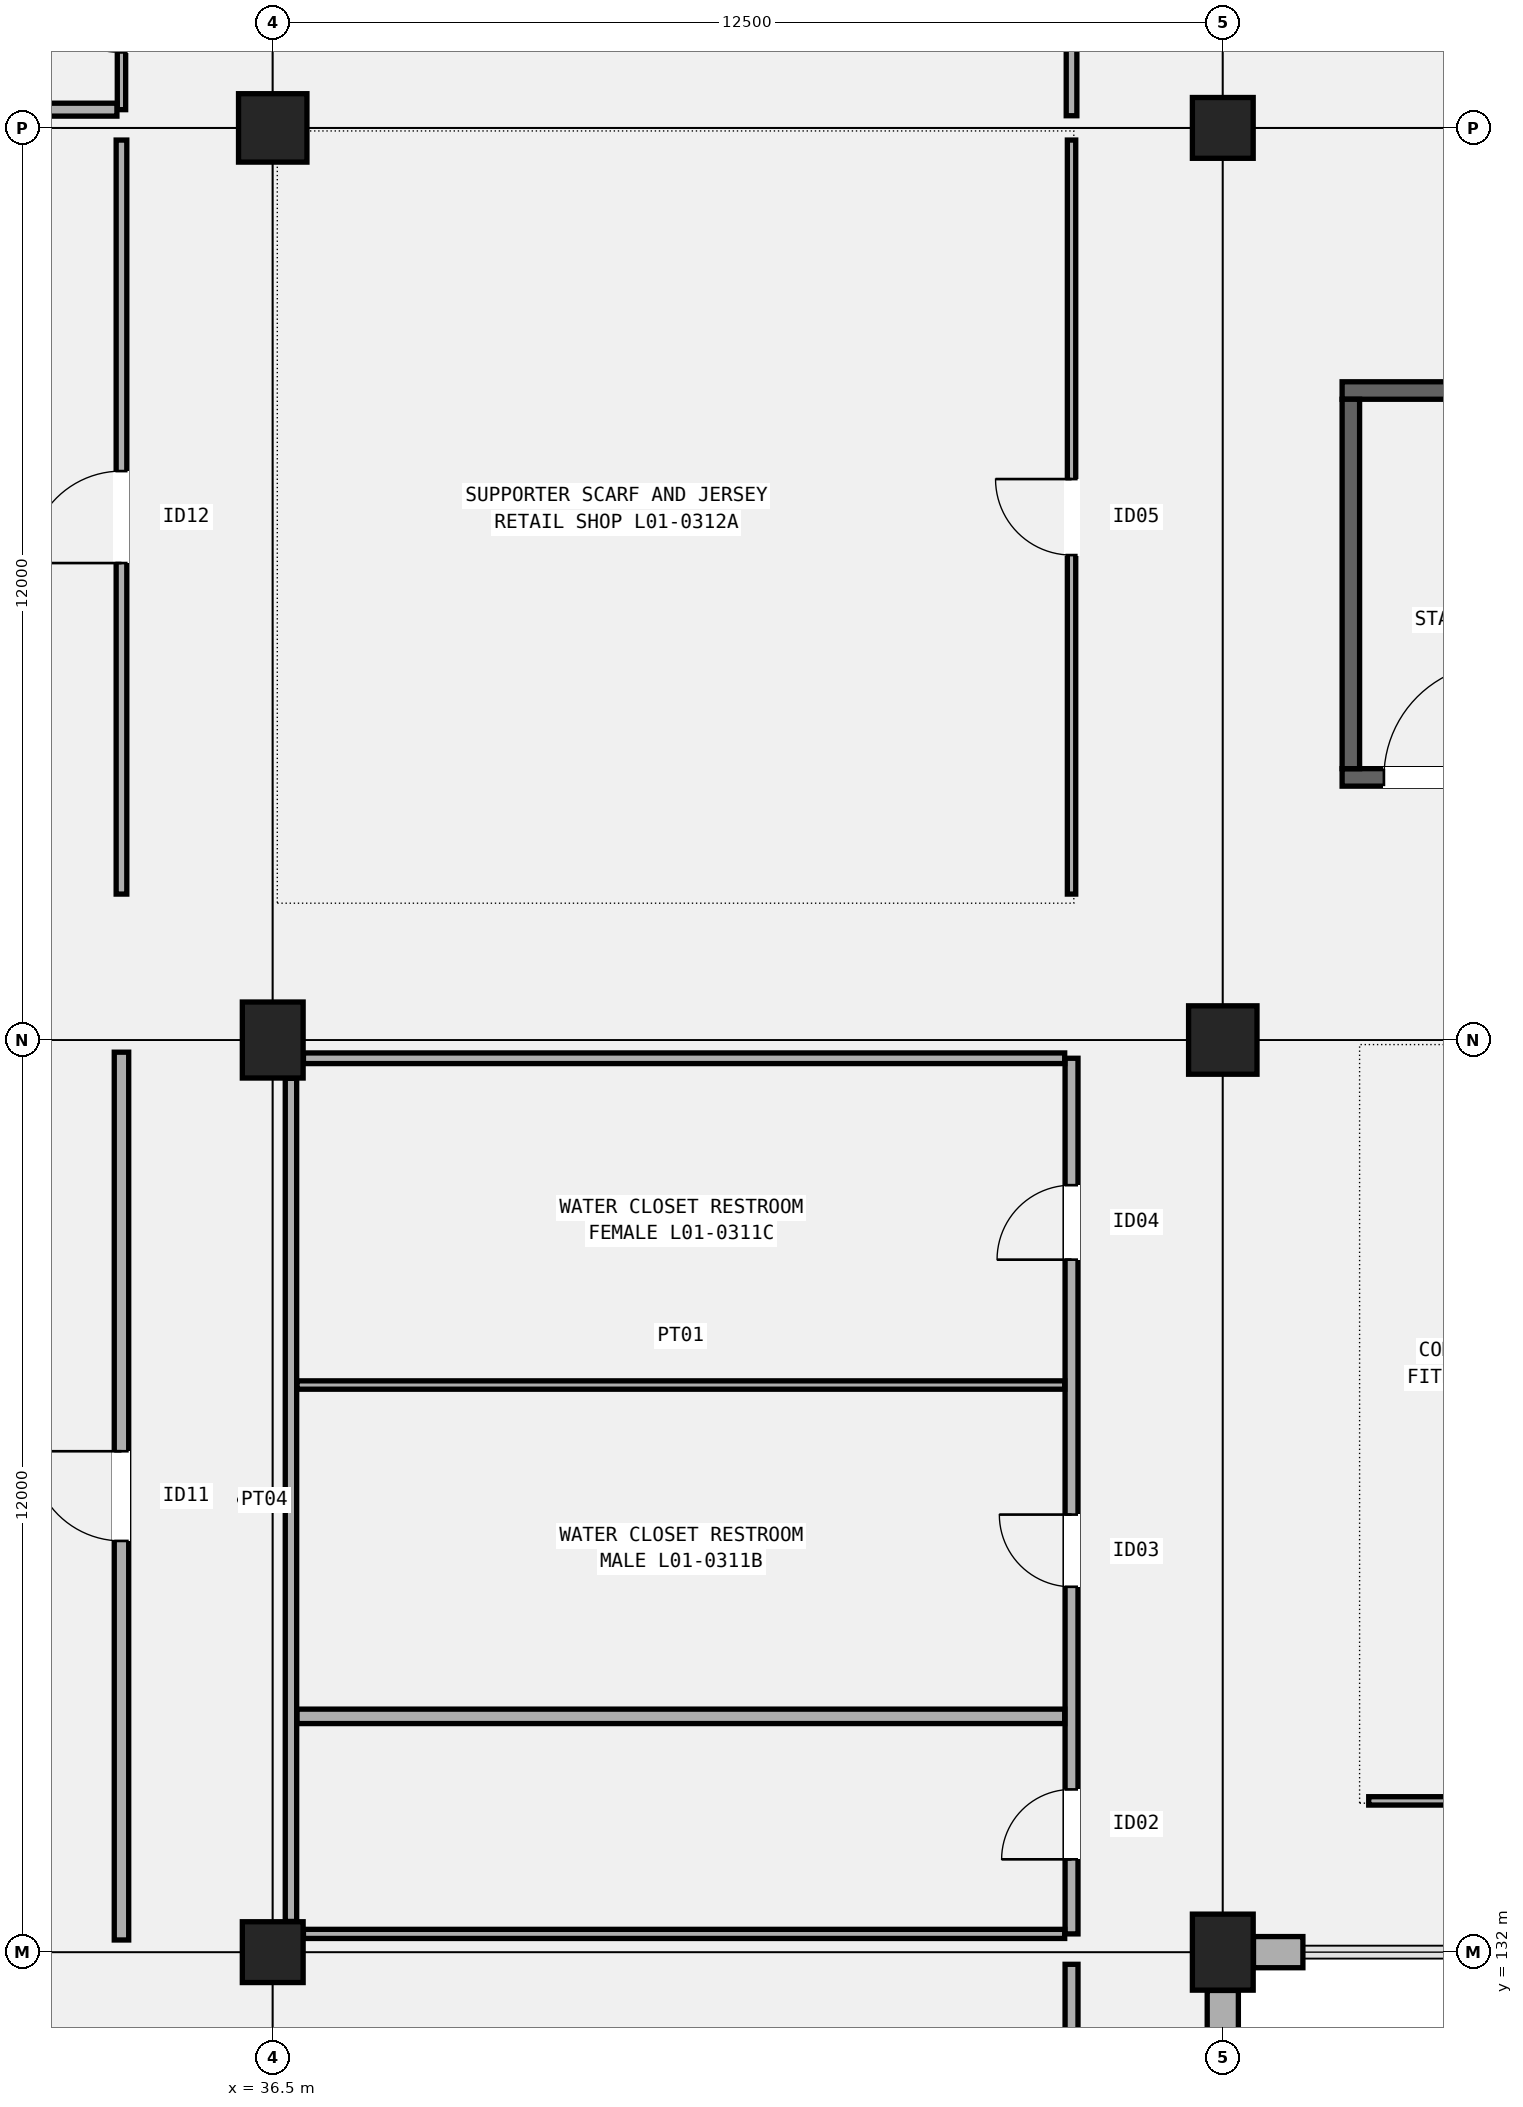
"""IFC4 building model, lengths in metres.
Left out: names, types, materials, properties, quantities, classifications, styles, units other than length and angle.
Written with IfcOpenShell. Run it as: python <this file> out.ifc"""

import sys

from ifc_helpers import new_model, si_unit, direction, frame, frame_2d, origin, origin_2d, place, context, subcontext, project, spatial, rectangle, extrude, element, fill, save


model = new_model("IFC4")
c1 = context("Model", 3, precision=1e-05, world=origin(), true_north=direction((0.0, 1.0)))
c2 = subcontext(c1, "Body", "Model", "MODEL_VIEW")
j1 = project(units=[si_unit("LENGTHUNIT", "METRE"), si_unit("PLANEANGLEUNIT", "RADIAN")], contexts=[c1])
p1 = place(None, origin())
s1 = spatial("IfcSite", under=j1, at=p1, CompositionType="ELEMENT")
p2 = place(p1, origin())
s2 = spatial("IfcBuilding", under=s1, at=p2, CompositionType="ELEMENT")
p3 = place(p2, frame((0.0, 0.0, 5.4)))
s3 = spatial("IfcBuildingStorey", under=s2, at=p3, CompositionType="ELEMENT", Elevation=5.4)
p4 = place(p3, frame((36.5, 132.0, 0.0), z_axis=(0.0, 0.0, 1.0), x_axis=(1.0, 0.0, 0.0)))
e1 = element("IfcColumn", 1, at=p4, inside=s3, PredefinedType="COLUMN", context=c2, shape_type="SweptSolid", body=[
    extrude(rectangle(XDim=0.8, YDim=0.8, at=origin_2d()), origin(), (0.0, 0.0, 1.0), 4.8),
])
p5 = place(p3, frame((36.5, 144.0, 0.0), z_axis=(0.0, 0.0, 1.0), x_axis=(1.0, 0.0, 0.0)))
e2 = element("IfcColumn", 2, at=p5, inside=s3, PredefinedType="COLUMN", context=c2, shape_type="SweptSolid", body=[
    extrude(rectangle(XDim=0.8, YDim=1.0, at=origin_2d()), origin(), (0.0, 0.0, 1.0), 4.8),
])
p6 = place(p3, frame((36.5, 156.0, 0.0), z_axis=(0.0, 0.0, 1.0), x_axis=(1.0, 0.0, 0.0)))
e3 = element("IfcColumn", 3, at=p6, inside=s3, PredefinedType="COLUMN", context=c2, shape_type="SweptSolid", body=[
    extrude(rectangle(XDim=0.9, YDim=0.9, at=origin_2d()), origin(), (0.0, 0.0, 1.0), 4.8),
])
p7 = place(p3, frame((49.0, 132.0, 0.0), z_axis=(0.0, 0.0, 1.0), x_axis=(1.0, 0.0, 0.0)))
e4 = element("IfcColumn", 4, at=p7, inside=s3, PredefinedType="COLUMN", context=c2, shape_type="SweptSolid", body=[
    extrude(rectangle(XDim=0.8, YDim=1.0, at=origin_2d()), origin(), (0.0, 0.0, 1.0), 4.8),
])
p8 = place(p3, frame((49.0, 144.0, 0.0), z_axis=(0.0, 0.0, 1.0), x_axis=(1.0, 0.0, 0.0)))
e5 = element("IfcColumn", 5, at=p8, inside=s3, PredefinedType="COLUMN", context=c2, shape_type="SweptSolid", body=[
    extrude(rectangle(XDim=0.9, YDim=0.9, at=origin_2d()), origin(), (0.0, 0.0, 1.0), 4.8),
])
p9 = place(p3, frame((49.0, 156.0, 0.0), z_axis=(0.0, 0.0, 1.0), x_axis=(1.0, 0.0, 0.0)))
e6 = element("IfcColumn", 6, at=p9, inside=s3, PredefinedType="COLUMN", context=c2, shape_type="SweptSolid", body=[
    extrude(rectangle(XDim=0.8, YDim=0.8, at=origin_2d()), origin(), (0.0, 0.0, 1.0), 4.8),
])
p10 = place(p3, frame((49.0, 130.846, 0.0), z_axis=(0.0, 0.0, 1.0), x_axis=(0.0, 1.0, 0.0)))
e7 = element("IfcWall", 7, at=p10, inside=s3, PredefinedType="SOLIDWALL", context=c2, shape_type="SweptSolid", body=[
    extrude(rectangle(XDim=0.65, YDim=0.41, at=frame_2d((0.325, 0.0))), origin(), (0.0, 0.0, 1.0), 4.15),
])
p11 = place(p3, frame((49.404, 132.0, 0.0), z_axis=(0.0, 0.0, 1.0), x_axis=(1.0, 0.0, 0.0)))
e8 = element("IfcWall", 8, at=p11, inside=s3, PredefinedType="SOLIDWALL", context=c2, shape_type="SweptSolid", body=[
    extrude(rectangle(XDim=0.65, YDim=0.41, at=frame_2d((0.325, 0.0))), origin(), (0.0, 0.0, 1.0), 4.2),
])
p12 = place(p3, frame((50.57, 147.455, 0.0), z_axis=(0.0, 0.0, 1.0), x_axis=(1.0, 0.0, 0.0)))
e9 = element("IfcWall", 9, at=p12, inside=s3, PredefinedType="SHEAR", context=c2, shape_type="SweptSolid", body=[
    extrude(rectangle(XDim=9.36, YDim=0.23, at=frame_2d((4.68, 0.0))), origin(), (0.0, 0.0, 1.0), 4.55),
])
p13 = place(p12, frame((0.55, 0.0, 0.0)))
e10 = element("IfcOpeningElement", 10, at=p13, cuts=e9, PredefinedType="OPENING", context=c2, shape_type="SweptSolid", body=[
    extrude(rectangle(XDim=1.5, YDim=2.2, at=frame_2d((0.75, 1.1))), frame((0.0, 0.125, 0.0), z_axis=(0.0, -1.0, 0.0), x_axis=(1.0, 0.0, 0.0)), (0.0, 0.0, 1.0), 0.25),
])
p14 = place(p3, frame((50.57, 152.545, 0.0), z_axis=(0.0, 0.0, 1.0), x_axis=(1.0, 0.0, 0.0)))
e11 = element("IfcWall", 11, at=p14, inside=s3, PredefinedType="SHEAR", context=c2, shape_type="SweptSolid", body=[
    extrude(rectangle(XDim=9.36, YDim=0.23, at=frame_2d((4.68, 0.0))), origin(), (0.0, 0.0, 1.0), 4.55),
])
p15 = place(p3, frame((50.685, 147.57, 0.0), z_axis=(0.0, 0.0, 1.0), x_axis=(0.0, 1.0, 0.0)))
e12 = element("IfcWall", 12, at=p15, inside=s3, PredefinedType="SHEAR", context=c2, shape_type="SweptSolid", body=[
    extrude(rectangle(XDim=4.86, YDim=0.23, at=frame_2d((2.43, 0.0))), origin(), (0.0, 0.0, 1.0), 4.55),
])
p16 = place(p3, frame((34.51, 132.16, 0.0), z_axis=(0.0, 0.0, 1.0), x_axis=(0.0, 1.0, 0.0)))
e13 = element("IfcWall", 13, at=p16, inside=s3, PredefinedType="PARTITIONING", context=c2, shape_type="SweptSolid", body=[
    extrude(rectangle(XDim=11.68, YDim=0.19, at=frame_2d((5.84, 0.0))), origin(), (0.0, 0.0, 1.0), 3.92),
])
p17 = place(p16, frame((5.25, 0.0, 0.0)))
e14 = element("IfcOpeningElement", 14, at=p17, cuts=e13, PredefinedType="OPENING", context=c2, shape_type="SweptSolid", body=[
    extrude(rectangle(XDim=1.18, YDim=2.2, at=frame_2d((0.59, 1.1))), frame((0.0, 0.105, 0.0), z_axis=(0.0, -1.0, 0.0), x_axis=(1.0, 0.0, 0.0)), (0.0, 0.0, 1.0), 0.21),
])
p18 = place(p3, frame((34.51, 145.92, 0.0), z_axis=(0.0, 0.0, 1.0), x_axis=(0.0, 1.0, 0.0)))
e15 = element("IfcWall", 15, at=p18, inside=s3, PredefinedType="PARTITIONING", context=c2, shape_type="SweptSolid", body=[
    extrude(rectangle(XDim=9.92, YDim=0.14, at=frame_2d((4.96, 0.0))), origin(), (0.0, 0.0, 1.0), 3.92),
])
p19 = place(p18, frame((4.355, 0.0, 0.0)))
e16 = element("IfcOpeningElement", 16, at=p19, cuts=e15, PredefinedType="OPENING", context=c2, shape_type="SweptSolid", body=[
    extrude(rectangle(XDim=1.21, YDim=2.18, at=frame_2d((0.605, 1.09))), frame((0.0, 0.08, 0.0), z_axis=(0.0, -1.0, 0.0), x_axis=(1.0, 0.0, 0.0)), (0.0, 0.0, 1.0), 0.16),
])
p20 = place(p3, frame((34.51, 156.24, 0.0), z_axis=(0.0, 0.0, 1.0), x_axis=(0.0, 1.0, 0.0)))
e17 = element("IfcWall", 17, at=p20, inside=s3, PredefinedType="PARTITIONING", context=c2, shape_type="SweptSolid", body=[
    extrude(rectangle(XDim=11.553, YDim=0.11, at=frame_2d((5.776, 0.0))), origin(), (0.0, 0.0, 1.0), 3.92),
])
p21 = place(p20, frame((0.753, 0.0, 0.0)))
e18 = element("IfcOpeningElement", 18, at=p21, cuts=e17, PredefinedType="OPENING", context=c2, shape_type="SweptSolid", body=[
    extrude(rectangle(XDim=1.24, YDim=2.22, at=frame_2d((0.62, 1.11))), frame((0.0, 0.065, 0.0), z_axis=(0.0, -1.0, 0.0), x_axis=(1.0, 0.0, 0.0)), (0.0, 0.0, 1.0), 0.13),
])
p22 = place(p20, frame((4.305, 0.0, 0.0)))
e19 = element("IfcOpeningElement", 19, at=p22, cuts=e17, PredefinedType="OPENING", context=c2, shape_type="SweptSolid", body=[
    extrude(rectangle(XDim=1.27, YDim=2.2, at=frame_2d((0.635, 1.1))), frame((0.0, 0.065, 0.0), z_axis=(0.0, -1.0, 0.0), x_axis=(1.0, 0.0, 0.0)), (0.0, 0.0, 1.0), 0.13),
])
p23 = place(p20, frame((8.677, 0.0, 0.0)))
e20 = element("IfcOpeningElement", 20, at=p23, cuts=e17, PredefinedType="OPENING", context=c2, shape_type="SweptSolid", body=[
    extrude(rectangle(XDim=1.3, YDim=2.24, at=frame_2d((0.65, 1.12))), frame((0.0, 0.065, 0.0), z_axis=(0.0, -1.0, 0.0), x_axis=(1.0, 0.0, 0.0)), (0.0, 0.0, 1.0), 0.13),
])
p24 = place(p3, frame((24.404, 156.24, 0.0), z_axis=(0.0, 0.0, 1.0), x_axis=(1.0, 0.0, 0.0)))
e21 = element("IfcWall", 21, at=p24, inside=s3, PredefinedType="PARTITIONING", context=c2, shape_type="SweptSolid", body=[
    extrude(rectangle(XDim=10.046, YDim=0.17, at=frame_2d((5.023, 0.0))), origin(), (0.0, 0.0, 1.0), 3.71),
])
p25 = place(p3, frame((47.01, 120.16, 0.0), z_axis=(0.0, 0.0, 1.0), x_axis=(0.0, 1.0, 0.0)))
e22 = element("IfcWall", 22, at=p25, inside=s3, PredefinedType="PARTITIONING", context=c2, shape_type="SweptSolid", body=[
    extrude(rectangle(XDim=11.68, YDim=0.17, at=frame_2d((5.84, 0.0))), origin(), (0.0, 0.0, 1.0), 3.92),
])
p26 = place(p25, frame((2.058, 0.0, 0.0)))
e23 = element("IfcOpeningElement", 23, at=p26, cuts=e22, PredefinedType="OPENING", context=c2, shape_type="SweptSolid", body=[
    extrude(rectangle(XDim=1.76, YDim=2.3, at=frame_2d((0.88, 1.15))), frame((0.0, 0.095, 0.0), z_axis=(0.0, -1.0, 0.0), x_axis=(1.0, 0.0, 0.0)), (0.0, 0.0, 1.0), 0.19),
])
p27 = place(p25, frame((8.408, 0.0, 0.0)))
e24 = element("IfcOpeningElement", 24, at=p27, cuts=e22, PredefinedType="OPENING", context=c2, shape_type="SweptSolid", body=[
    extrude(rectangle(XDim=0.9, YDim=2.06, at=frame_2d((0.45, 1.03))), frame((0.0, 0.095, 0.0), z_axis=(0.0, -1.0, 0.0), x_axis=(1.0, 0.0, 0.0)), (0.0, 0.0, 1.0), 0.19),
])
p28 = place(p3, frame((47.01, 132.24, 0.0), z_axis=(0.0, 0.0, 1.0), x_axis=(0.0, 1.0, 0.0)))
e25 = element("IfcWall", 25, at=p28, inside=s3, PredefinedType="PARTITIONING", context=c2, shape_type="SweptSolid", body=[
    extrude(rectangle(XDim=11.52, YDim=0.17, at=frame_2d((5.76, 0.0))), origin(), (0.0, 0.0, 1.0), 3.92),
])
p29 = place(p28, frame((0.981, 0.0, 0.0)))
e26 = element("IfcOpeningElement", 26, at=p29, cuts=e25, PredefinedType="OPENING", context=c2, shape_type="SweptSolid", body=[
    extrude(rectangle(XDim=0.92, YDim=2.1, at=frame_2d((0.46, 1.05))), frame((0.0, 0.095, 0.0), z_axis=(0.0, -1.0, 0.0), x_axis=(1.0, 0.0, 0.0)), (0.0, 0.0, 1.0), 0.19),
])
p30 = place(p28, frame((4.567, 0.0, 0.0)))
e27 = element("IfcOpeningElement", 27, at=p30, cuts=e25, PredefinedType="OPENING", context=c2, shape_type="SweptSolid", body=[
    extrude(rectangle(XDim=0.95, YDim=2.12, at=frame_2d((0.475, 1.06))), frame((0.0, 0.095, 0.0), z_axis=(0.0, -1.0, 0.0), x_axis=(1.0, 0.0, 0.0)), (0.0, 0.0, 1.0), 0.19),
])
p31 = place(p28, frame((8.871, 0.0, 0.0)))
e28 = element("IfcOpeningElement", 28, at=p31, cuts=e25, PredefinedType="OPENING", context=c2, shape_type="SweptSolid", body=[
    extrude(rectangle(XDim=0.98, YDim=2.1, at=frame_2d((0.49, 1.05))), frame((0.0, 0.095, 0.0), z_axis=(0.0, -1.0, 0.0), x_axis=(1.0, 0.0, 0.0)), (0.0, 0.0, 1.0), 0.19),
])
p32 = place(p3, frame((36.904, 132.24, 0.0), z_axis=(0.0, 0.0, 1.0), x_axis=(1.0, 0.0, 0.0)))
e29 = element("IfcWall", 29, at=p32, inside=s3, PredefinedType="PARTITIONING", context=c2, shape_type="SweptSolid", body=[
    extrude(rectangle(XDim=10.016, YDim=0.12, at=frame_2d((5.008, 0.0))), origin(), (0.0, 0.0, 1.0), 3.92),
])
p33 = place(p3, frame((36.904, 143.76, 0.0), z_axis=(0.0, 0.0, 1.0), x_axis=(1.0, 0.0, 0.0)))
e30 = element("IfcWall", 30, at=p33, inside=s3, PredefinedType="PARTITIONING", context=c2, shape_type="SweptSolid", body=[
    extrude(rectangle(XDim=10.016, YDim=0.14, at=frame_2d((5.008, 0.0))), origin(), (0.0, 0.0, 1.0), 3.71),
])
p34 = place(p3, frame((36.74, 132.404, 0.0), z_axis=(0.0, 0.0, 1.0), x_axis=(0.0, 1.0, 0.0)))
e31 = element("IfcWall", 31, at=p34, inside=s3, PredefinedType="PARTITIONING", context=c2, shape_type="SweptSolid", body=[
    extrude(rectangle(XDim=11.092, YDim=0.15, at=frame_2d((5.546, 0.0))), origin(), (0.0, 0.0, 1.0), 3.92),
])
p35 = place(p3, frame((36.82, 135.102, 0.0), z_axis=(0.0, 0.0, 1.0), x_axis=(1.0, 0.0, 0.0)))
e32 = element("IfcWall", 32, at=p35, inside=s3, PredefinedType="PARTITIONING", context=c2, shape_type="SweptSolid", body=[
    extrude(rectangle(XDim=10.1, YDim=0.19, at=frame_2d((5.05, 0.0))), origin(), (0.0, 0.0, 1.0), 3.92),
])
p36 = place(p3, frame((36.82, 139.461, 0.0), z_axis=(0.0, 0.0, 1.0), x_axis=(1.0, 0.0, 0.0)))
e33 = element("IfcWall", 33, at=p36, inside=s3, PredefinedType="PARTITIONING", context=c2, shape_type="SweptSolid", body=[
    extrude(rectangle(XDim=10.1, YDim=0.11, at=frame_2d((5.05, 0.0))), origin(), (0.0, 0.0, 1.0), 3.92),
])
p37 = place(p3, frame((47.01, 145.92, 0.0), z_axis=(0.0, 0.0, 1.0), x_axis=(0.0, 1.0, 0.0)))
e34 = element("IfcWall", 34, at=p37, inside=s3, PredefinedType="PARTITIONING", context=c2, shape_type="SweptSolid", body=[
    extrude(rectangle(XDim=9.92, YDim=0.11, at=frame_2d((4.96, 0.0))), origin(), (0.0, 0.0, 1.0), 3.92),
])
p38 = place(p37, frame((4.46, 0.0, 0.0)))
e35 = element("IfcOpeningElement", 35, at=p38, cuts=e34, PredefinedType="OPENING", context=c2, shape_type="SweptSolid", body=[
    extrude(rectangle(XDim=1.0, YDim=2.14, at=frame_2d((0.5, 1.07))), frame((0.0, 0.065, 0.0), z_axis=(0.0, -1.0, 0.0), x_axis=(1.0, 0.0, 0.0)), (0.0, 0.0, 1.0), 0.13),
])
p39 = place(p3, frame((47.01, 156.16, 0.0), z_axis=(0.0, 0.0, 1.0), x_axis=(0.0, 1.0, 0.0)))
e36 = element("IfcWall", 36, at=p39, inside=s3, PredefinedType="PARTITIONING", context=c2, shape_type="SweptSolid", body=[
    extrude(rectangle(XDim=11.698, YDim=0.14, at=frame_2d((5.849, 0.0))), origin(), (0.0, 0.0, 1.0), 3.92),
])
p40 = place(p39, frame((5.325, 0.0, 0.0)))
e37 = element("IfcOpeningElement", 37, at=p40, cuts=e36, PredefinedType="OPENING", context=c2, shape_type="SweptSolid", body=[
    extrude(rectangle(XDim=1.03, YDim=2.12, at=frame_2d((0.515, 1.06))), frame((0.0, 0.08, 0.0), z_axis=(0.0, -1.0, 0.0), x_axis=(1.0, 0.0, 0.0)), (0.0, 0.0, 1.0), 0.16),
])
p41 = place(p3, frame((50.92, 133.99, 0.0), z_axis=(0.0, 0.0, 1.0), x_axis=(1.0, 0.0, 0.0)))
e38 = element("IfcWall", 38, at=p41, inside=s3, PredefinedType="PARTITIONING", context=c2, shape_type="SweptSolid", body=[
    extrude(rectangle(XDim=10.42, YDim=0.11, at=frame_2d((5.21, 0.0))), origin(), (0.0, 0.0, 1.0), 3.92),
])
p42 = place(p41, frame((4.635, 0.0, 0.0)))
e39 = element("IfcOpeningElement", 39, at=p42, cuts=e38, PredefinedType="OPENING", context=c2, shape_type="SweptSolid", body=[
    extrude(rectangle(XDim=1.15, YDim=2.15, at=frame_2d((0.575, 1.075))), frame((0.0, 0.065, 0.0), z_axis=(0.0, -1.0, 0.0), x_axis=(1.0, 0.0, 0.0)), (0.0, 0.0, 1.0), 0.13),
])
p43 = place(p13, origin())
e40 = element("IfcDoor", 40, at=p43, inside=s3, OperationType="SINGLE_SWING_RIGHT", PredefinedType="DOOR", context=c2, shape_type="SweptSolid", body=[
    extrude(rectangle(XDim=1.5, YDim=2.2, at=frame_2d((0.75, 1.1))), frame((0.0, 0.025, 0.0), z_axis=(0.0, -1.0, 0.0), x_axis=(1.0, 0.0, 0.0)), (0.0, 0.0, 1.0), 0.05),
])
fill(e10, e40)
p44 = place(p17, origin())
e41 = element("IfcDoor", 41, at=p44, inside=s3, OperationType="SINGLE_SWING_RIGHT", PredefinedType="DOOR", context=c2, shape_type="SweptSolid", body=[
    extrude(rectangle(XDim=1.18, YDim=2.2, at=frame_2d((0.59, 1.1))), frame((0.0, 0.025, 0.0), z_axis=(0.0, -1.0, 0.0), x_axis=(1.0, 0.0, 0.0)), (0.0, 0.0, 1.0), 0.05),
])
fill(e14, e41)
p45 = place(p19, origin())
e42 = element("IfcDoor", 42, at=p45, inside=s3, OperationType="SINGLE_SWING_LEFT", PredefinedType="DOOR", context=c2, shape_type="SweptSolid", body=[
    extrude(rectangle(XDim=1.21, YDim=2.18, at=frame_2d((0.605, 1.09))), frame((0.0, 0.025, 0.0), z_axis=(0.0, -1.0, 0.0), x_axis=(1.0, 0.0, 0.0)), (0.0, 0.0, 1.0), 0.05),
])
fill(e16, e42)
p46 = place(p21, origin())
e43 = element("IfcDoor", 43, at=p46, inside=s3, OperationType="SINGLE_SWING_RIGHT", PredefinedType="DOOR", context=c2, shape_type="SweptSolid", body=[
    extrude(rectangle(XDim=1.24, YDim=2.22, at=frame_2d((0.62, 1.11))), frame((0.0, 0.025, 0.0), z_axis=(0.0, -1.0, 0.0), x_axis=(1.0, 0.0, 0.0)), (0.0, 0.0, 1.0), 0.05),
])
fill(e18, e43)
p47 = place(p29, origin())
e44 = element("IfcDoor", 44, at=p47, inside=s3, OperationType="SINGLE_SWING_LEFT", PredefinedType="DOOR", context=c2, shape_type="SweptSolid", body=[
    extrude(rectangle(XDim=0.92, YDim=2.1, at=frame_2d((0.46, 1.05))), frame((0.0, 0.025, 0.0), z_axis=(0.0, -1.0, 0.0), x_axis=(1.0, 0.0, 0.0)), (0.0, 0.0, 1.0), 0.05),
])
fill(e26, e44)
p48 = place(p30, origin())
e45 = element("IfcDoor", 45, at=p48, inside=s3, OperationType="SINGLE_SWING_RIGHT", PredefinedType="DOOR", context=c2, shape_type="SweptSolid", body=[
    extrude(rectangle(XDim=0.95, YDim=2.12, at=frame_2d((0.475, 1.06))), frame((0.0, 0.025, 0.0), z_axis=(0.0, -1.0, 0.0), x_axis=(1.0, 0.0, 0.0)), (0.0, 0.0, 1.0), 0.05),
])
fill(e27, e45)
p49 = place(p31, origin())
e46 = element("IfcDoor", 46, at=p49, inside=s3, OperationType="SINGLE_SWING_LEFT", PredefinedType="DOOR", context=c2, shape_type="SweptSolid", body=[
    extrude(rectangle(XDim=0.98, YDim=2.1, at=frame_2d((0.49, 1.05))), frame((0.0, 0.025, 0.0), z_axis=(0.0, -1.0, 0.0), x_axis=(1.0, 0.0, 0.0)), (0.0, 0.0, 1.0), 0.05),
])
fill(e28, e46)
p50 = place(p38, origin())
e47 = element("IfcDoor", 47, at=p50, inside=s3, OperationType="SINGLE_SWING_RIGHT", PredefinedType="DOOR", context=c2, shape_type="SweptSolid", body=[
    extrude(rectangle(XDim=1.0, YDim=2.14, at=frame_2d((0.5, 1.07))), frame((0.0, 0.025, 0.0), z_axis=(0.0, -1.0, 0.0), x_axis=(1.0, 0.0, 0.0)), (0.0, 0.0, 1.0), 0.05),
])
fill(e35, e47)
save(model, sys.argv[1])
